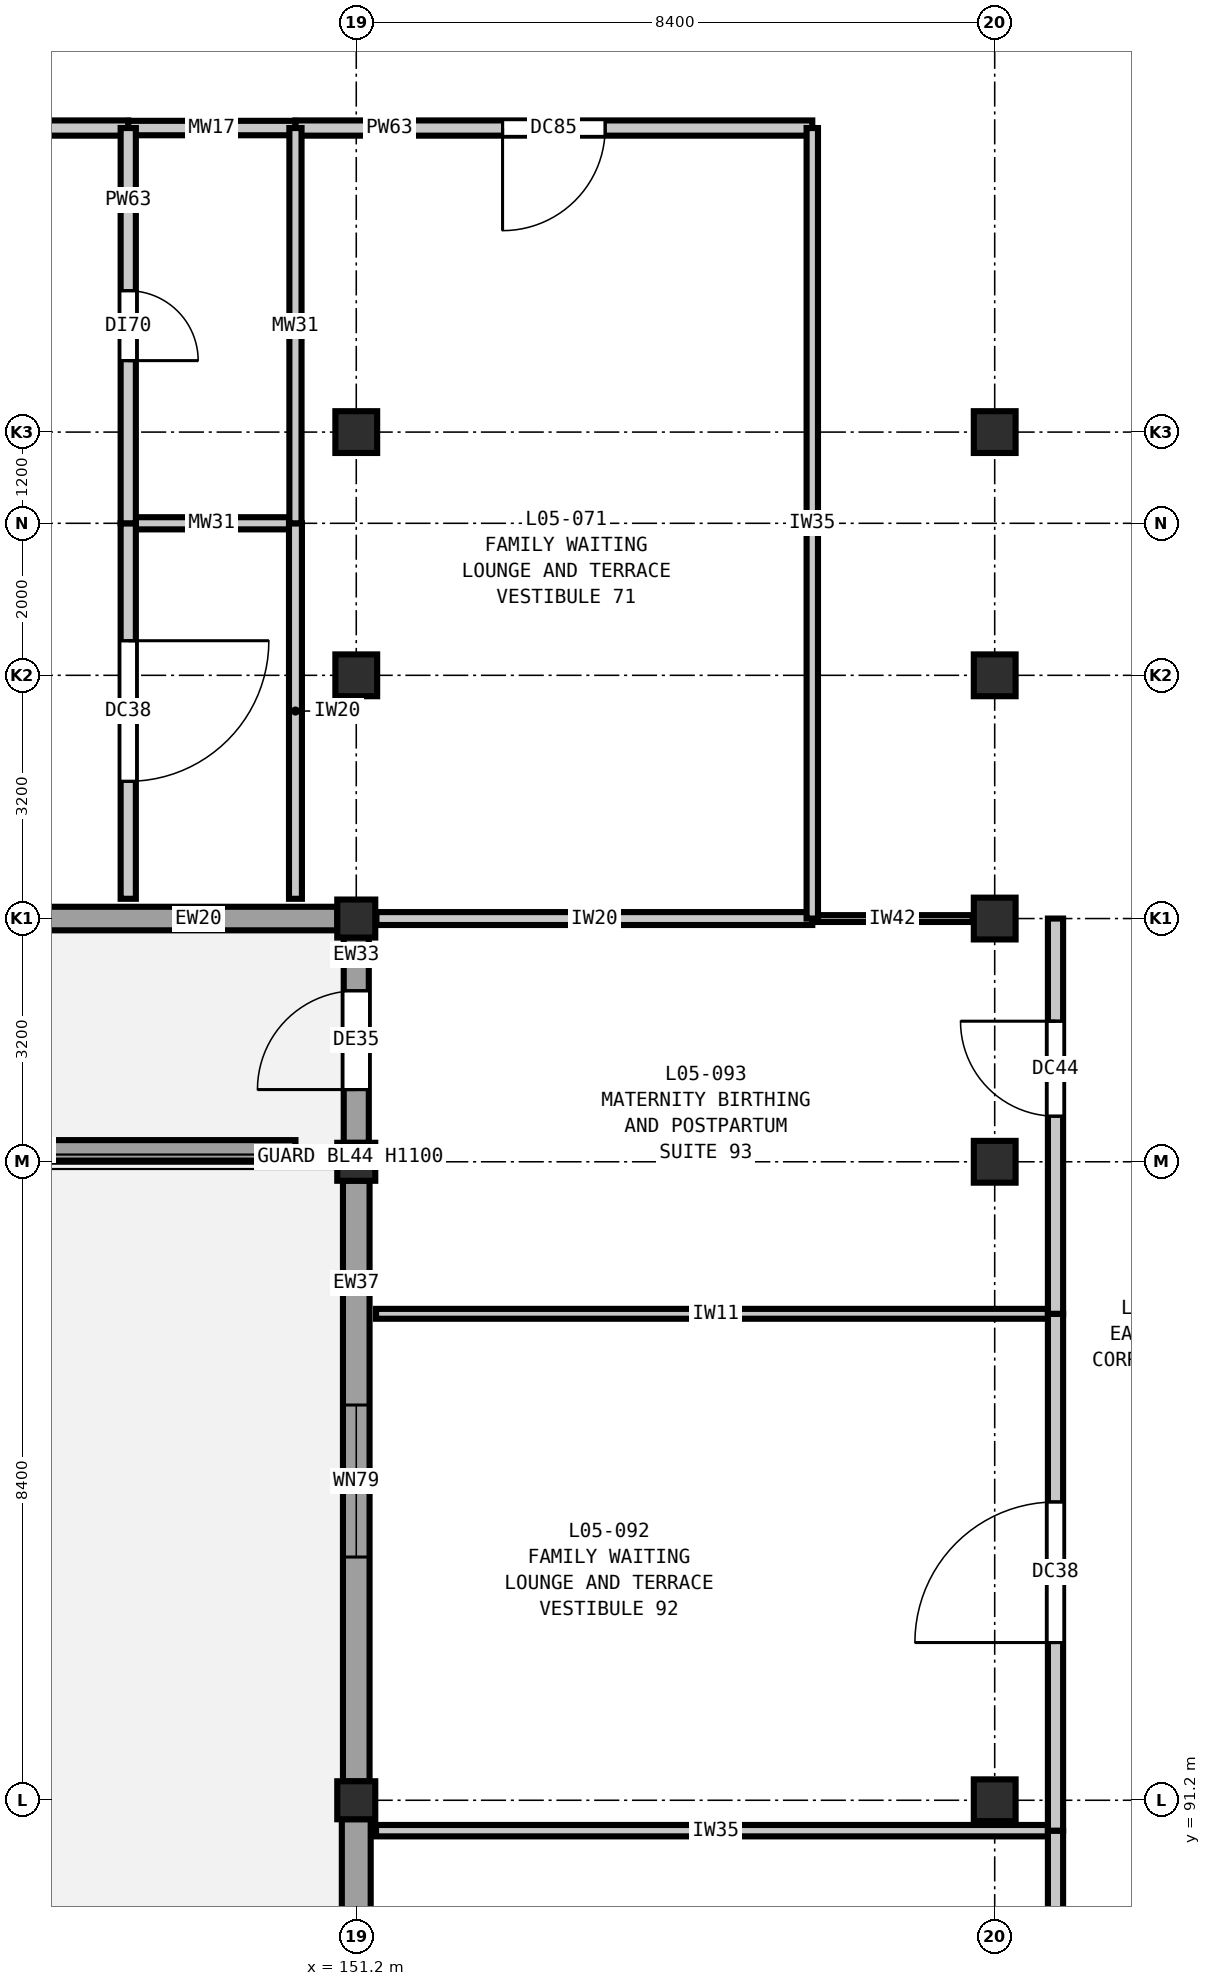
"""IFC4 building model, lengths in metres.
Left out: names, types, materials, properties, quantities, classifications, styles, units other than length and angle.
Written with IfcOpenShell. Run it as: python <this file> out.ifc"""

import sys

from ifc_helpers import new_model, si_unit, direction, frame, frame_2d, origin, origin_2d, place, context, subcontext, project, spatial, rectangle, extrude, element, fill, save


model = new_model("IFC4")
c1 = context("Model", 3, precision=1e-05, world=origin(), true_north=direction((0.0, 1.0)))
c2 = subcontext(c1, "Body", "Model", "MODEL_VIEW")
j1 = project(units=[si_unit("LENGTHUNIT", "METRE"), si_unit("PLANEANGLEUNIT", "RADIAN")], contexts=[c1])
p1 = place(None, origin())
s1 = spatial("IfcSite", under=j1, at=p1, CompositionType="ELEMENT")
p2 = place(p1, origin())
s2 = spatial("IfcBuilding", under=s1, at=p2, CompositionType="ELEMENT")
p3 = place(p2, frame((0.0, 0.0, 24.6)))
s3 = spatial("IfcBuildingStorey", under=s2, at=p3, CompositionType="ELEMENT", Elevation=24.6)
for number, where, z_axis, x_axis in (
    (1, (151.2, 91.2, 0.0), (0.0, 0.0, 1.0), (1.0, 0.0, 0.0)),
    (2, (151.2, 99.6, 0.0), (0.0, 0.0, 1.0), (1.0, 0.0, 0.0)),
    (3, (151.2, 102.8, 0.0), (0.0, 0.0, 1.0), (1.0, 0.0, 0.0)),
):
    element("IfcColumn", number, at=place(p3, frame(where, z_axis=z_axis, x_axis=x_axis)), inside=s3, PredefinedType="COLUMN", context=c2, shape_type="SweptSolid", body=[
        extrude(rectangle(XDim=0.5, YDim=0.5, at=origin_2d()), origin(), (0.0, 0.0, 1.0), 4.2),
    ])
for number, where, z_axis, x_axis in (
    (4, (151.2, 106.0, 0.0), (0.0, 0.0, 1.0), (1.0, 0.0, 0.0)),
    (5, (151.2, 109.2, 0.0), (0.0, 0.0, 1.0), (1.0, 0.0, 0.0)),
    (6, (159.6, 91.2, 0.0), (0.0, 0.0, 1.0), (1.0, 0.0, 0.0)),
    (7, (159.6, 99.6, 0.0), (0.0, 0.0, 1.0), (1.0, 0.0, 0.0)),
    (8, (159.6, 102.8, 0.0), (0.0, 0.0, 1.0), (1.0, 0.0, 0.0)),
    (9, (159.6, 106.0, 0.0), (0.0, 0.0, 1.0), (1.0, 0.0, 0.0)),
    (10, (159.6, 109.2, 0.0), (0.0, 0.0, 1.0), (1.0, 0.0, 0.0)),
):
    element("IfcColumn", number, at=place(p3, frame(where, z_axis=z_axis, x_axis=x_axis)), inside=s3, PredefinedType="COLUMN", context=c2, shape_type="SweptSolid", body=[
        extrude(rectangle(XDim=0.55, YDim=0.55, at=origin_2d()), origin(), (0.0, 0.0, 1.0), 4.2),
    ])
p4 = place(p3, frame((151.2, 83.048, 0.0), z_axis=(0.0, 0.0, 1.0), x_axis=(0.0, 1.0, 0.0)))
e11 = element("IfcWall", 11, at=p4, inside=s3, PredefinedType="SOLIDWALL", context=c2, shape_type="SweptSolid", body=[
    extrude(rectangle(XDim=7.904, YDim=0.38, at=frame_2d((3.952, 0.0))), origin(), (0.0, 0.0, 1.0), 3.48),
])
p5 = place(p4, frame((3.252, 0.0, 0.0)))
e12 = element("IfcOpeningElement", 12, at=p5, cuts=e11, PredefinedType="OPENING", context=c2, shape_type="SweptSolid", body=[
    extrude(rectangle(XDim=1.4, YDim=2.2, at=frame_2d((0.7, 1.1))), frame((0.0, 0.2, 0.0), z_axis=(0.0, -1.0, 0.0), x_axis=(1.0, 0.0, 0.0)), (0.0, 0.0, 1.0), 0.4),
])
p6 = place(p3, frame((151.2, 91.448, 0.0), z_axis=(0.0, 0.0, 1.0), x_axis=(0.0, 1.0, 0.0)))
e13 = element("IfcWall", 13, at=p6, inside=s3, PredefinedType="SOLIDWALL", context=c2, shape_type="SweptSolid", body=[
    extrude(rectangle(XDim=7.904, YDim=0.35, at=frame_2d((3.952, 0.0))), origin(), (0.0, 0.0, 1.0), 3.48),
])
p7 = place(p6, frame((2.952, 0.0, 0.9)))
e14 = element("IfcOpeningElement", 14, at=p7, cuts=e13, PredefinedType="OPENING", context=c2, shape_type="SweptSolid", body=[
    extrude(rectangle(XDim=2.0, YDim=1.95, at=frame_2d((1.0, 0.975))), frame((0.0, 0.185, 0.0), z_axis=(0.0, -1.0, 0.0), x_axis=(1.0, 0.0, 0.0)), (0.0, 0.0, 1.0), 0.37),
])
p8 = place(p3, frame((151.2, 99.848, 0.0), z_axis=(0.0, 0.0, 1.0), x_axis=(0.0, 1.0, 0.0)))
e15 = element("IfcWall", 15, at=p8, inside=s3, PredefinedType="SOLIDWALL", context=c2, shape_type="SweptSolid", body=[
    extrude(rectangle(XDim=2.704, YDim=0.33, at=frame_2d((1.352, 0.0))), origin(), (0.0, 0.0, 1.0), 3.48),
])
p9 = place(p8, frame((0.702, 0.0, 0.0)))
e16 = element("IfcOpeningElement", 16, at=p9, cuts=e15, PredefinedType="OPENING", context=c2, shape_type="SweptSolid", body=[
    extrude(rectangle(XDim=1.3, YDim=2.15, at=frame_2d((0.65, 1.075))), frame((0.0, 0.175, 0.0), z_axis=(0.0, -1.0, 0.0), x_axis=(1.0, 0.0, 0.0)), (0.0, 0.0, 1.0), 0.35),
])
p10 = place(p3, frame((150.952, 102.8, 0.0), z_axis=(0.0, 0.0, 1.0), x_axis=(-1.0, 0.0, 0.0)))
e17 = element("IfcWall", 17, at=p10, inside=s3, PredefinedType="SOLIDWALL", context=c2, shape_type="SweptSolid", body=[
    extrude(rectangle(XDim=7.904, YDim=0.31, at=frame_2d((3.952, 0.0))), origin(), (0.0, 0.0, 1.0), 3.48),
])
p11 = place(p10, frame((3.909, 0.0, 0.9)))
e18 = element("IfcOpeningElement", 18, at=p11, cuts=e17, PredefinedType="OPENING", context=c2, shape_type="SweptSolid", body=[
    extrude(rectangle(XDim=2.2, YDim=1.95, at=frame_2d((1.1, 0.975))), frame((0.0, 0.165, 0.0), z_axis=(0.0, -1.0, 0.0), x_axis=(1.0, 0.0, 0.0)), (0.0, 0.0, 1.0), 0.33),
])
p12 = place(p3, frame((143.4, 99.75, 0.0), z_axis=(0.0, 0.0, 1.0), x_axis=(1.0, 0.0, 0.0)))
e19 = element("IfcWall", 19, at=p12, inside=s3, PredefinedType="PARAPET", context=c2, shape_type="SweptSolid", body=[
    extrude(rectangle(XDim=7.0, YDim=0.27, at=frame_2d((3.5, 0.0))), origin(), (0.0, 0.0, 1.0), 0.95),
])
p13 = place(p3, frame((151.46, 90.8, 0.0), z_axis=(0.0, 0.0, 1.0), x_axis=(1.0, 0.0, 0.0)))
e20 = element("IfcWall", 20, at=p13, inside=s3, PredefinedType="PARTITIONING", context=c2, shape_type="SweptSolid", body=[
    extrude(rectangle(XDim=8.94, YDim=0.15, at=frame_2d((4.47, 0.0))), origin(), (0.0, 0.0, 1.0), 3.92),
])
p14 = place(p3, frame((151.46, 97.6, 0.0), z_axis=(0.0, 0.0, 1.0), x_axis=(1.0, 0.0, 0.0)))
e21 = element("IfcWall", 21, at=p14, inside=s3, PredefinedType="PARTITIONING", context=c2, shape_type="SweptSolid", body=[
    extrude(rectangle(XDim=8.94, YDim=0.13, at=frame_2d((4.47, 0.0))), origin(), (0.0, 0.0, 1.0), 3.92),
])
p15 = place(p3, frame((151.465, 102.8, 0.0), z_axis=(0.0, 0.0, 1.0), x_axis=(1.0, 0.0, 0.0)))
e22 = element("IfcWall", 22, at=p15, inside=s3, PredefinedType="PARTITIONING", context=c2, shape_type="SweptSolid", body=[
    extrude(rectangle(XDim=5.735, YDim=0.17, at=frame_2d((2.867, 0.0))), origin(), (0.0, 0.0, 1.0), 3.585),
])
p16 = place(p3, frame((157.2, 102.8, 0.0), z_axis=(0.0, 0.0, 1.0), x_axis=(1.0, 0.0, 0.0)))
e23 = element("IfcWall", 23, at=p16, inside=s3, PredefinedType="PARTITIONING", context=c2, shape_type="SweptSolid", body=[
    extrude(rectangle(XDim=2.11, YDim=0.09, at=frame_2d((1.055, 0.0))), origin(), (0.0, 0.0, 1.0), 3.585),
])
p17 = place(p3, frame((148.2, 108.0, 0.0), z_axis=(0.0, 0.0, 1.0), x_axis=(1.0, 0.0, 0.0)))
e24 = element("IfcWall", 24, at=p17, inside=s3, PredefinedType="PLUMBINGWALL", context=c2, shape_type="SweptSolid", body=[
    extrude(rectangle(XDim=2.2, YDim=0.16, at=frame_2d((1.1, 0.0))), origin(), (0.0, 0.0, 1.0), 3.92),
])
p18 = place(p3, frame((142.4, 113.2, 0.0), z_axis=(0.0, 0.0, 1.0), x_axis=(1.0, 0.0, 0.0)))
e25 = element("IfcWall", 25, at=p18, inside=s3, PredefinedType="PARTITIONING", context=c2, shape_type="SweptSolid", body=[
    extrude(rectangle(XDim=5.8, YDim=0.2, at=frame_2d((2.9, 0.0))), origin(), (0.0, 0.0, 1.0), 3.92),
])
p19 = place(p18, frame((2.25, 0.0, 0.0)))
e26 = element("IfcOpeningElement", 26, at=p19, cuts=e25, PredefinedType="OPENING", context=c2, shape_type="SweptSolid", body=[
    extrude(rectangle(XDim=1.3, YDim=2.2, at=frame_2d((0.65, 1.1))), frame((0.0, 0.11, 0.0), z_axis=(0.0, -1.0, 0.0), x_axis=(1.0, 0.0, 0.0)), (0.0, 0.0, 1.0), 0.22),
])
p20 = place(p3, frame((148.2, 113.2, 0.0), z_axis=(0.0, 0.0, 1.0), x_axis=(1.0, 0.0, 0.0)))
e27 = element("IfcWall", 27, at=p20, inside=s3, PredefinedType="PLUMBINGWALL", context=c2, shape_type="SweptSolid", body=[
    extrude(rectangle(XDim=2.2, YDim=0.19, at=frame_2d((1.1, 0.0))), origin(), (0.0, 0.0, 1.0), 3.92),
])
p21 = place(p3, frame((150.4, 113.2, 0.0), z_axis=(0.0, 0.0, 1.0), x_axis=(1.0, 0.0, 0.0)))
e28 = element("IfcWall", 28, at=p21, inside=s3, PredefinedType="PARTITIONING", context=c2, shape_type="SweptSolid", body=[
    extrude(rectangle(XDim=6.8, YDim=0.2, at=frame_2d((3.4, 0.0))), origin(), (0.0, 0.0, 1.0), 3.92),
])
p22 = place(p21, frame((2.725, 0.0, 0.0)))
e29 = element("IfcOpeningElement", 29, at=p22, cuts=e28, PredefinedType="OPENING", context=c2, shape_type="SweptSolid", body=[
    extrude(rectangle(XDim=1.35, YDim=2.2, at=frame_2d((0.675, 1.1))), frame((0.0, 0.11, 0.0), z_axis=(0.0, -1.0, 0.0), x_axis=(1.0, 0.0, 0.0)), (0.0, 0.0, 1.0), 0.22),
])
p23 = place(p3, frame((148.2, 103.06, 0.0), z_axis=(0.0, 0.0, 1.0), x_axis=(0.0, 1.0, 0.0)))
e30 = element("IfcWall", 30, at=p23, inside=s3, PredefinedType="PARTITIONING", context=c2, shape_type="SweptSolid", body=[
    extrude(rectangle(XDim=4.94, YDim=0.2, at=frame_2d((2.47, 0.0))), origin(), (0.0, 0.0, 1.0), 3.92),
])
p24 = place(p23, frame((1.545, 0.0, 0.0)))
e31 = element("IfcOpeningElement", 31, at=p24, cuts=e30, PredefinedType="OPENING", context=c2, shape_type="SweptSolid", body=[
    extrude(rectangle(XDim=1.85, YDim=2.3, at=frame_2d((0.925, 1.15))), frame((0.0, 0.11, 0.0), z_axis=(0.0, -1.0, 0.0), x_axis=(1.0, 0.0, 0.0)), (0.0, 0.0, 1.0), 0.22),
])
p25 = place(p3, frame((148.2, 108.0, 0.0), z_axis=(0.0, 0.0, 1.0), x_axis=(0.0, 1.0, 0.0)))
e32 = element("IfcWall", 32, at=p25, inside=s3, PredefinedType="PARTITIONING", context=c2, shape_type="SweptSolid", body=[
    extrude(rectangle(XDim=5.2, YDim=0.2, at=frame_2d((2.6, 0.0))), origin(), (0.0, 0.0, 1.0), 3.92),
])
p26 = place(p25, frame((2.14, 0.0, 0.0)))
e33 = element("IfcOpeningElement", 33, at=p26, cuts=e32, PredefinedType="OPENING", context=c2, shape_type="SweptSolid", body=[
    extrude(rectangle(XDim=0.92, YDim=2.1, at=frame_2d((0.46, 1.05))), frame((0.0, 0.11, 0.0), z_axis=(0.0, -1.0, 0.0), x_axis=(1.0, 0.0, 0.0)), (0.0, 0.0, 1.0), 0.22),
])
p27 = place(p3, frame((150.4, 103.06, 0.0), z_axis=(0.0, 0.0, 1.0), x_axis=(0.0, 1.0, 0.0)))
e34 = element("IfcWall", 34, at=p27, inside=s3, PredefinedType="PARTITIONING", context=c2, shape_type="SweptSolid", body=[
    extrude(rectangle(XDim=4.94, YDim=0.17, at=frame_2d((2.47, 0.0))), origin(), (0.0, 0.0, 1.0), 3.92),
])
p28 = place(p3, frame((150.4, 108.0, 0.0), z_axis=(0.0, 0.0, 1.0), x_axis=(0.0, 1.0, 0.0)))
e35 = element("IfcWall", 35, at=p28, inside=s3, PredefinedType="PLUMBINGWALL", context=c2, shape_type="SweptSolid", body=[
    extrude(rectangle(XDim=5.2, YDim=0.16, at=frame_2d((2.6, 0.0))), origin(), (0.0, 0.0, 1.0), 3.92),
])
p29 = place(p3, frame((157.2, 102.8, 0.0), z_axis=(0.0, 0.0, 1.0), x_axis=(0.0, 1.0, 0.0)))
e36 = element("IfcWall", 36, at=p29, inside=s3, PredefinedType="PARTITIONING", context=c2, shape_type="SweptSolid", body=[
    extrude(rectangle(XDim=10.4, YDim=0.15, at=frame_2d((5.2, 0.0))), origin(), (0.0, 0.0, 1.0), 3.92),
])
p30 = place(p3, frame((160.4, 82.8, 0.0), z_axis=(0.0, 0.0, 1.0), x_axis=(0.0, 1.0, 0.0)))
e37 = element("IfcWall", 37, at=p30, inside=s3, PredefinedType="PARTITIONING", context=c2, shape_type="SweptSolid", body=[
    extrude(rectangle(XDim=8.0, YDim=0.2, at=frame_2d((4.0, 0.0))), origin(), (0.0, 0.0, 1.0), 3.92),
])
p31 = place(p30, frame((3.15, 0.0, 0.0)))
e38 = element("IfcOpeningElement", 38, at=p31, cuts=e37, PredefinedType="OPENING", context=c2, shape_type="SweptSolid", body=[
    extrude(rectangle(XDim=1.7, YDim=2.3, at=frame_2d((0.85, 1.15))), frame((0.0, 0.11, 0.0), z_axis=(0.0, -1.0, 0.0), x_axis=(1.0, 0.0, 0.0)), (0.0, 0.0, 1.0), 0.22),
])
p32 = place(p3, frame((160.4, 90.8, 0.0), z_axis=(0.0, 0.0, 1.0), x_axis=(0.0, 1.0, 0.0)))
e39 = element("IfcWall", 39, at=p32, inside=s3, PredefinedType="PARTITIONING", context=c2, shape_type="SweptSolid", body=[
    extrude(rectangle(XDim=6.8, YDim=0.2, at=frame_2d((3.4, 0.0))), origin(), (0.0, 0.0, 1.0), 3.92),
])
p33 = place(p32, frame((2.475, 0.0, 0.0)))
e40 = element("IfcOpeningElement", 40, at=p33, cuts=e39, PredefinedType="OPENING", context=c2, shape_type="SweptSolid", body=[
    extrude(rectangle(XDim=1.85, YDim=2.3, at=frame_2d((0.925, 1.15))), frame((0.0, 0.11, 0.0), z_axis=(0.0, -1.0, 0.0), x_axis=(1.0, 0.0, 0.0)), (0.0, 0.0, 1.0), 0.22),
])
p34 = place(p3, frame((160.4, 97.6, 0.0), z_axis=(0.0, 0.0, 1.0), x_axis=(0.0, 1.0, 0.0)))
e41 = element("IfcWall", 41, at=p34, inside=s3, PredefinedType="PARTITIONING", context=c2, shape_type="SweptSolid", body=[
    extrude(rectangle(XDim=5.2, YDim=0.2, at=frame_2d((2.6, 0.0))), origin(), (0.0, 0.0, 1.0), 3.92),
])
p35 = place(p34, frame((2.6, 0.0, 0.0)))
e42 = element("IfcOpeningElement", 42, at=p35, cuts=e41, PredefinedType="OPENING", context=c2, shape_type="SweptSolid", body=[
    extrude(rectangle(XDim=1.25, YDim=2.15, at=frame_2d((0.625, 1.075))), frame((0.0, 0.11, 0.0), z_axis=(0.0, -1.0, 0.0), x_axis=(1.0, 0.0, 0.0)), (0.0, 0.0, 1.0), 0.22),
])
p36 = place(p7, origin())
e43 = element("IfcWindow", 43, at=p36, inside=s3, PartitioningType="DOUBLE_PANEL_VERTICAL", PredefinedType="WINDOW", context=c2, shape_type="SweptSolid", body=[
    extrude(rectangle(XDim=2.0, YDim=1.95, at=frame_2d((1.0, 0.975))), frame((0.0, 0.03, 0.0), z_axis=(0.0, -1.0, 0.0), x_axis=(1.0, 0.0, 0.0)), (0.0, 0.0, 1.0), 0.06),
])
fill(e14, e43)
p37 = place(p9, origin())
e44 = element("IfcDoor", 44, at=p37, inside=s3, OperationType="SINGLE_SWING_LEFT", PredefinedType="DOOR", context=c2, shape_type="SweptSolid", body=[
    extrude(rectangle(XDim=1.3, YDim=2.15, at=frame_2d((0.65, 1.075))), frame((0.0, 0.025, 0.0), z_axis=(0.0, -1.0, 0.0), x_axis=(1.0, 0.0, 0.0)), (0.0, 0.0, 1.0), 0.05),
])
fill(e16, e44)
p38 = place(p22, frame((1.35, 0.0, 0.0), z_axis=(0.0, 0.0, 1.0), x_axis=(-1.0, 0.0, 0.0)))
e45 = element("IfcDoor", 45, at=p38, inside=s3, OperationType="SINGLE_SWING_RIGHT", PredefinedType="DOOR", context=c2, shape_type="SweptSolid", body=[
    extrude(rectangle(XDim=1.35, YDim=2.2, at=frame_2d((0.675, 1.1))), frame((0.0, 0.025, 0.0), z_axis=(0.0, -1.0, 0.0), x_axis=(1.0, 0.0, 0.0)), (0.0, 0.0, 1.0), 0.05),
])
fill(e29, e45)
p39 = place(p24, frame((1.85, 0.0, 0.0), z_axis=(0.0, 0.0, 1.0), x_axis=(-1.0, 0.0, 0.0)))
e46 = element("IfcDoor", 46, at=p39, inside=s3, OperationType="SINGLE_SWING_LEFT", PredefinedType="DOOR", context=c2, shape_type="SweptSolid", body=[
    extrude(rectangle(XDim=1.85, YDim=2.3, at=frame_2d((0.925, 1.15))), frame((0.0, 0.025, 0.0), z_axis=(0.0, -1.0, 0.0), x_axis=(1.0, 0.0, 0.0)), (0.0, 0.0, 1.0), 0.05),
])
fill(e31, e46)
p40 = place(p26, frame((0.92, 0.0, 0.0), z_axis=(0.0, 0.0, 1.0), x_axis=(-1.0, 0.0, 0.0)))
e47 = element("IfcDoor", 47, at=p40, inside=s3, OperationType="SINGLE_SWING_RIGHT", PredefinedType="DOOR", context=c2, shape_type="SweptSolid", body=[
    extrude(rectangle(XDim=0.92, YDim=2.1, at=frame_2d((0.46, 1.05))), frame((0.0, 0.025, 0.0), z_axis=(0.0, -1.0, 0.0), x_axis=(1.0, 0.0, 0.0)), (0.0, 0.0, 1.0), 0.05),
])
fill(e33, e47)
p41 = place(p33, origin())
e48 = element("IfcDoor", 48, at=p41, inside=s3, OperationType="SINGLE_SWING_LEFT", PredefinedType="DOOR", context=c2, shape_type="SweptSolid", body=[
    extrude(rectangle(XDim=1.85, YDim=2.3, at=frame_2d((0.925, 1.15))), frame((0.0, 0.025, 0.0), z_axis=(0.0, -1.0, 0.0), x_axis=(1.0, 0.0, 0.0)), (0.0, 0.0, 1.0), 0.05),
])
fill(e40, e48)
p42 = place(p35, origin())
e49 = element("IfcDoor", 49, at=p42, inside=s3, OperationType="SINGLE_SWING_RIGHT", PredefinedType="DOOR", context=c2, shape_type="SweptSolid", body=[
    extrude(rectangle(XDim=1.25, YDim=2.15, at=frame_2d((0.625, 1.075))), frame((0.0, 0.025, 0.0), z_axis=(0.0, -1.0, 0.0), x_axis=(1.0, 0.0, 0.0)), (0.0, 0.0, 1.0), 0.05),
])
fill(e42, e49)
save(model, sys.argv[1])
